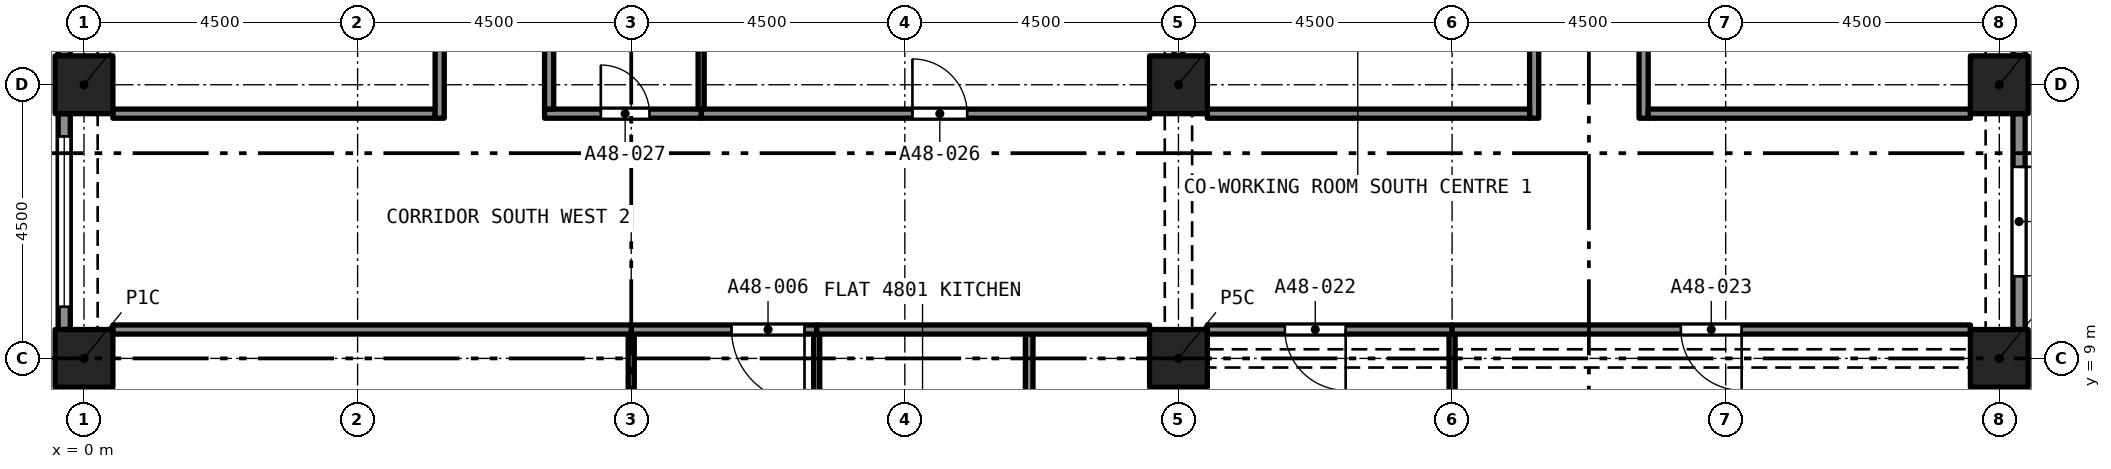
"""IFC4 building model, lengths in metres.
Left out: names, types, materials, properties, quantities, classifications, styles, units other than length and angle.
Written with IfcOpenShell. Run it as: python <this file> out.ifc"""

import sys

from ifc_helpers import new_model, si_unit, direction, frame, frame_2d, origin, origin_2d, place, context, subcontext, project, spatial, rectangle, extrude, element, fill, save


model = new_model("IFC4")
c1 = context("Model", 3, precision=1e-05, world=origin(), true_north=direction((0.0, 1.0)))
c2 = subcontext(c1, "Body", "Model", "MODEL_VIEW")
j1 = project(units=[si_unit("LENGTHUNIT", "METRE"), si_unit("PLANEANGLEUNIT", "RADIAN")], contexts=[c1])
p1 = place(None, origin())
s1 = spatial("IfcSite", under=j1, at=p1, CompositionType="ELEMENT")
p2 = place(p1, origin())
s2 = spatial("IfcBuilding", under=s1, at=p2, CompositionType="ELEMENT")
p3 = place(p2, frame((0.0, 0.0, 176.3)))
s3 = spatial("IfcBuildingStorey", under=s2, at=p3, CompositionType="ELEMENT", Elevation=176.3)
for number, where, z_axis, x_axis in (
    (1, (0.0, 9.0, 0.0), (0.0, 0.0, 1.0), (1.0, 0.0, 0.0)),
    (2, (18.0, 9.0, 0.0), (0.0, 0.0, 1.0), (1.0, 0.0, 0.0)),
    (3, (31.5, 9.0, 0.0), (0.0, 0.0, 1.0), (1.0, 0.0, 0.0)),
    (4, (0.0, 13.5, 0.0), (0.0, 0.0, 1.0), (1.0, 0.0, 0.0)),
    (5, (18.0, 13.5, 0.0), (0.0, 0.0, 1.0), (1.0, 0.0, 0.0)),
    (6, (31.5, 13.5, 0.0), (0.0, 0.0, 1.0), (1.0, 0.0, 0.0)),
):
    element("IfcColumn", number, at=place(p3, frame(where, z_axis=z_axis, x_axis=x_axis)), inside=s3, PredefinedType="COLUMN", context=c2, shape_type="SweptSolid", body=[
        extrude(rectangle(XDim=0.95, YDim=0.95, at=origin_2d()), origin(), (0.0, 0.0, 1.0), 3.2),
    ])
p4 = place(p3, frame((31.825, 8.525, 0.0), z_axis=(0.0, 0.0, 1.0), x_axis=(0.0, -1.0, 0.0)))
e7 = element("IfcWall", 7, at=p4, inside=s3, PredefinedType="SOLIDWALL", context=c2, shape_type="SweptSolid", body=[
    extrude(rectangle(XDim=3.55, YDim=0.2, at=frame_2d((1.775, 0.0))), origin(), (0.0, 0.0, 1.0), 3.2),
])
p5 = place(p4, frame((0.875, 0.0, 0.0)))
e8 = element("IfcOpeningElement", 8, at=p5, cuts=e7, PredefinedType="OPENING", context=c2, shape_type="SweptSolid", body=[
    extrude(rectangle(XDim=1.8, YDim=2.4, at=frame_2d((0.9, 1.2))), frame((0.0, 0.11, 0.0), z_axis=(0.0, -1.0, 0.0), x_axis=(1.0, 0.0, 0.0)), (0.0, 0.0, 1.0), 0.22),
])
p6 = place(p3, frame((31.825, 13.025, 0.0), z_axis=(0.0, 0.0, 1.0), x_axis=(0.0, -1.0, 0.0)))
e9 = element("IfcWall", 9, at=p6, inside=s3, PredefinedType="SOLIDWALL", context=c2, shape_type="SweptSolid", body=[
    extrude(rectangle(XDim=3.55, YDim=0.2, at=frame_2d((1.775, 0.0))), origin(), (0.0, 0.0, 1.0), 3.2),
])
p7 = place(p6, frame((0.875, 0.0, 0.0)))
e10 = element("IfcOpeningElement", 10, at=p7, cuts=e9, PredefinedType="OPENING", context=c2, shape_type="SweptSolid", body=[
    extrude(rectangle(XDim=1.8, YDim=2.4, at=frame_2d((0.9, 1.2))), frame((0.0, 0.11, 0.0), z_axis=(0.0, -1.0, 0.0), x_axis=(1.0, 0.0, 0.0)), (0.0, 0.0, 1.0), 0.22),
])
p8 = place(p3, frame((31.825, 17.525, 0.0), z_axis=(0.0, 0.0, 1.0), x_axis=(0.0, -1.0, 0.0)))
e11 = element("IfcWall", 11, at=p8, inside=s3, PredefinedType="SOLIDWALL", context=c2, shape_type="SweptSolid", body=[
    extrude(rectangle(XDim=3.55, YDim=0.2, at=frame_2d((1.775, 0.0))), origin(), (0.0, 0.0, 1.0), 3.2),
])
p9 = place(p8, frame((0.875, 0.0, 0.0)))
e12 = element("IfcOpeningElement", 12, at=p9, cuts=e11, PredefinedType="OPENING", context=c2, shape_type="SweptSolid", body=[
    extrude(rectangle(XDim=1.8, YDim=2.4, at=frame_2d((0.9, 1.2))), frame((0.0, 0.11, 0.0), z_axis=(0.0, -1.0, 0.0), x_axis=(1.0, 0.0, 0.0)), (0.0, 0.0, 1.0), 0.22),
])
p10 = place(p3, frame((-0.325, 13.975, 0.0), z_axis=(0.0, 0.0, 1.0), x_axis=(0.0, 1.0, 0.0)))
e13 = element("IfcWall", 13, at=p10, inside=s3, PredefinedType="SOLIDWALL", context=c2, shape_type="SweptSolid", body=[
    extrude(rectangle(XDim=3.55, YDim=0.2, at=frame_2d((1.775, 0.0))), origin(), (0.0, 0.0, 1.0), 3.2),
])
p11 = place(p10, frame((0.375, 0.0, 0.45)))
e14 = element("IfcOpeningElement", 14, at=p11, cuts=e13, PredefinedType="OPENING", context=c2, shape_type="SweptSolid", body=[
    extrude(rectangle(XDim=2.8, YDim=1.95, at=frame_2d((1.4, 0.975))), frame((0.0, 0.11, 0.0), z_axis=(0.0, -1.0, 0.0), x_axis=(1.0, 0.0, 0.0)), (0.0, 0.0, 1.0), 0.22),
])
p12 = place(p3, frame((-0.325, 9.475, 0.0), z_axis=(0.0, 0.0, 1.0), x_axis=(0.0, 1.0, 0.0)))
e15 = element("IfcWall", 15, at=p12, inside=s3, PredefinedType="SOLIDWALL", context=c2, shape_type="SweptSolid", body=[
    extrude(rectangle(XDim=3.55, YDim=0.2, at=frame_2d((1.775, 0.0))), origin(), (0.0, 0.0, 1.0), 3.2),
])
p13 = place(p12, frame((0.375, 0.0, 0.45)))
e16 = element("IfcOpeningElement", 16, at=p13, cuts=e15, PredefinedType="OPENING", context=c2, shape_type="SweptSolid", body=[
    extrude(rectangle(XDim=2.8, YDim=1.95, at=frame_2d((1.4, 0.975))), frame((0.0, 0.11, 0.0), z_axis=(0.0, -1.0, 0.0), x_axis=(1.0, 0.0, 0.0)), (0.0, 0.0, 1.0), 0.22),
])
p14 = place(p3, frame((-0.325, 4.975, 0.0), z_axis=(0.0, 0.0, 1.0), x_axis=(0.0, 1.0, 0.0)))
e17 = element("IfcWall", 17, at=p14, inside=s3, PredefinedType="SOLIDWALL", context=c2, shape_type="SweptSolid", body=[
    extrude(rectangle(XDim=3.55, YDim=0.2, at=frame_2d((1.775, 0.0))), origin(), (0.0, 0.0, 1.0), 3.2),
])
p15 = place(p14, frame((0.375, 0.0, 0.45)))
e18 = element("IfcOpeningElement", 18, at=p15, cuts=e17, PredefinedType="OPENING", context=c2, shape_type="SweptSolid", body=[
    extrude(rectangle(XDim=2.8, YDim=1.95, at=frame_2d((1.4, 0.975))), frame((0.0, 0.11, 0.0), z_axis=(0.0, -1.0, 0.0), x_axis=(1.0, 0.0, 0.0)), (0.0, 0.0, 1.0), 0.22),
])
p16 = place(p3, frame((15.545, 6.077, 0.0), z_axis=(0.0, 0.0, 1.0), x_axis=(0.0, 1.0, 0.0)))
e19 = element("IfcWall", 19, at=p16, inside=s3, PredefinedType="PARTITIONING", context=c2, shape_type="SweptSolid", body=[
    extrude(rectangle(XDim=3.323, YDim=0.125, at=frame_2d((1.661, 0.0))), origin(), (0.0, 0.0, 1.0), 2.9),
])
p17 = place(p3, frame((12.05, 6.065, 0.0), z_axis=(0.0, 0.0, 1.0), x_axis=(0.0, 1.0, 0.0)))
e20 = element("IfcWall", 20, at=p17, inside=s3, PredefinedType="PARTITIONING", context=c2, shape_type="SweptSolid", body=[
    extrude(rectangle(XDim=3.335, YDim=0.1, at=frame_2d((1.667, 0.0))), origin(), (0.0, 0.0, 1.0), 2.9),
])
p18 = place(p3, frame((9.0, 4.675, 0.0), z_axis=(0.0, 0.0, 1.0), x_axis=(0.0, 1.0, 0.0)))
e21 = element("IfcWall", 21, at=p18, inside=s3, PredefinedType="PARTITIONING", context=c2, shape_type="SweptSolid", body=[
    extrude(rectangle(XDim=4.725, YDim=0.1, at=frame_2d((2.362, 0.0))), origin(), (0.0, 0.0, 1.0), 2.9),
])
p19 = place(p18, frame((0.13, 0.0, 0.0)))
e22 = element("IfcOpeningElement", 22, at=p19, cuts=e21, PredefinedType="OPENING", context=c2, shape_type="SweptSolid", body=[
    extrude(rectangle(XDim=1.6, YDim=2.1, at=frame_2d((0.8, 1.05))), frame((0.0, 0.06, 0.0), z_axis=(0.0, -1.0, 0.0), x_axis=(1.0, 0.0, 0.0)), (0.0, 0.0, 1.0), 0.12),
])
p20 = place(p3, frame((18.0, 4.975, 0.0), z_axis=(0.0, 0.0, 1.0), x_axis=(0.0, 1.0, 0.0)))
e23 = element("IfcWall", 23, at=p20, inside=s3, PredefinedType="PARTITIONING", context=c2, shape_type="SweptSolid", body=[
    extrude(rectangle(XDim=3.55, YDim=0.25, at=frame_2d((1.775, 0.0))), origin(), (0.0, 0.0, 1.0), 2.38),
])
p21 = place(p3, frame((12.05, 9.475, 0.0), z_axis=(0.0, 0.0, 1.0), x_axis=(-1.0, 0.0, 0.0)))
e24 = element("IfcWall", 24, at=p21, inside=s3, PredefinedType="PARTITIONING", context=c2, shape_type="SweptSolid", body=[
    extrude(rectangle(XDim=3.05, YDim=0.15, at=frame_2d((1.525, 0.0))), origin(), (0.0, 0.0, 1.0), 2.9),
])
p22 = place(p21, frame((0.2, 0.0, 0.0)))
e25 = element("IfcOpeningElement", 25, at=p22, cuts=e24, PredefinedType="OPENING", context=c2, shape_type="SweptSolid", body=[
    extrude(rectangle(XDim=1.2, YDim=2.4, at=frame_2d((0.6, 1.2))), frame((0.0, 0.085, 0.0), z_axis=(0.0, -1.0, 0.0), x_axis=(1.0, 0.0, 0.0)), (0.0, 0.0, 1.0), 0.17),
])
p23 = place(p3, frame((12.05, 9.475, 0.0), z_axis=(0.0, 0.0, 1.0), x_axis=(1.0, 0.0, 0.0)))
e26 = element("IfcWall", 26, at=p23, inside=s3, PredefinedType="PARTITIONING", context=c2, shape_type="SweptSolid", body=[
    extrude(rectangle(XDim=5.475, YDim=0.15, at=frame_2d((2.737, 0.0))), origin(), (0.0, 0.0, 1.0), 2.9),
])
p24 = place(p3, frame((0.475, 9.475, 0.0), z_axis=(0.0, 0.0, 1.0), x_axis=(1.0, 0.0, 0.0)))
e27 = element("IfcWall", 27, at=p24, inside=s3, PredefinedType="PARTITIONING", context=c2, shape_type="SweptSolid", body=[
    extrude(rectangle(XDim=8.525, YDim=0.15, at=frame_2d((4.262, 0.0))), origin(), (0.0, 0.0, 1.0), 2.9),
])
p25 = place(p3, frame((22.5, 0.475, 0.0), z_axis=(0.0, 0.0, 1.0), x_axis=(0.0, 1.0, 0.0)))
e28 = element("IfcWall", 28, at=p25, inside=s3, PredefinedType="PARTITIONING", context=c2, shape_type="SweptSolid", body=[
    extrude(rectangle(XDim=8.925, YDim=0.1, at=frame_2d((4.462, 0.0))), origin(), (0.0, 0.0, 1.0), 2.75),
])
p26 = place(p3, frame((22.5, 9.475, 0.0), z_axis=(0.0, 0.0, 1.0), x_axis=(-1.0, 0.0, 0.0)))
e29 = element("IfcWall", 29, at=p26, inside=s3, PredefinedType="PARTITIONING", context=c2, shape_type="SweptSolid", body=[
    extrude(rectangle(XDim=4.025, YDim=0.15, at=frame_2d((2.012, 0.0))), origin(), (0.0, 0.0, 1.0), 2.75),
])
p27 = place(p26, frame((1.75, 0.0, 0.0)))
e30 = element("IfcOpeningElement", 30, at=p27, cuts=e29, PredefinedType="OPENING", context=c2, shape_type="SweptSolid", body=[
    extrude(rectangle(XDim=1.0, YDim=2.1, at=frame_2d((0.5, 1.05))), frame((0.0, 0.085, 0.0), z_axis=(0.0, -1.0, 0.0), x_axis=(1.0, 0.0, 0.0)), (0.0, 0.0, 1.0), 0.17),
])
p28 = place(p3, frame((31.025, 9.475, 0.0), z_axis=(0.0, 0.0, 1.0), x_axis=(-1.0, 0.0, 0.0)))
e31 = element("IfcWall", 31, at=p28, inside=s3, PredefinedType="PARTITIONING", context=c2, shape_type="SweptSolid", body=[
    extrude(rectangle(XDim=8.525, YDim=0.15, at=frame_2d((4.262, 0.0))), origin(), (0.0, 0.0, 1.0), 2.75),
])
p29 = place(p28, frame((3.762, 0.0, 0.0)))
e32 = element("IfcOpeningElement", 32, at=p29, cuts=e31, PredefinedType="OPENING", context=c2, shape_type="SweptSolid", body=[
    extrude(rectangle(XDim=1.0, YDim=2.1, at=frame_2d((0.5, 1.05))), frame((0.0, 0.085, 0.0), z_axis=(0.0, -1.0, 0.0), x_axis=(1.0, 0.0, 0.0)), (0.0, 0.0, 1.0), 0.17),
])
p30 = place(p3, frame((23.85, 12.95, 0.0), z_axis=(0.0, 0.0, 1.0), x_axis=(0.0, 1.0, 0.0)))
e33 = element("IfcWall", 33, at=p30, inside=s3, PredefinedType="PARTITIONING", context=c2, shape_type="SweptSolid", body=[
    extrude(rectangle(XDim=9.625, YDim=0.15, at=frame_2d((4.812, 0.0))), origin(), (0.0, 0.0, 1.0), 2.75),
])
p31 = place(p30, frame((4.312, 0.0, 0.0)))
e34 = element("IfcOpeningElement", 34, at=p31, cuts=e33, PredefinedType="OPENING", context=c2, shape_type="SweptSolid", body=[
    extrude(rectangle(XDim=1.0, YDim=2.1, at=frame_2d((0.5, 1.05))), frame((0.0, 0.085, 0.0), z_axis=(0.0, -1.0, 0.0), x_axis=(1.0, 0.0, 0.0)), (0.0, 0.0, 1.0), 0.17),
])
p32 = place(p3, frame((25.65, 22.575, 0.0), z_axis=(0.0, 0.0, 1.0), x_axis=(0.0, -1.0, 0.0)))
e35 = element("IfcWall", 35, at=p32, inside=s3, PredefinedType="PARTITIONING", context=c2, shape_type="SweptSolid", body=[
    extrude(rectangle(XDim=9.625, YDim=0.15, at=frame_2d((4.812, 0.0))), origin(), (0.0, 0.0, 1.0), 2.75),
])
p33 = place(p32, frame((4.312, 0.0, 0.0)))
e36 = element("IfcOpeningElement", 36, at=p33, cuts=e35, PredefinedType="OPENING", context=c2, shape_type="SweptSolid", body=[
    extrude(rectangle(XDim=1.0, YDim=2.1, at=frame_2d((0.5, 1.05))), frame((0.0, 0.085, 0.0), z_axis=(0.0, -1.0, 0.0), x_axis=(1.0, 0.0, 0.0)), (0.0, 0.0, 1.0), 0.17),
])
for number, where, z_axis, x_axis in (
    (37, (18.475, 13.025, 0.0), (0.0, 0.0, 1.0), (1.0, 0.0, 0.0)),
    (38, (25.725, 13.025, 0.0), (0.0, 0.0, 1.0), (1.0, 0.0, 0.0)),
):
    element("IfcWall", number, at=place(p3, frame(where, z_axis=z_axis, x_axis=x_axis)), inside=s3, PredefinedType="PARTITIONING", context=c2, shape_type="SweptSolid", body=[
        extrude(rectangle(XDim=5.3, YDim=0.15, at=frame_2d((2.65, 0.0))), origin(), (0.0, 0.0, 1.0), 2.75),
    ])
p34 = place(p3, frame((10.15, 13.025, 0.0), z_axis=(0.0, 0.0, 1.0), x_axis=(1.0, 0.0, 0.0)))
e39 = element("IfcWall", 39, at=p34, inside=s3, PredefinedType="PARTITIONING", context=c2, shape_type="SweptSolid", body=[
    extrude(rectangle(XDim=7.375, YDim=0.15, at=frame_2d((3.688, 0.0))), origin(), (0.0, 0.0, 1.0), 2.9),
])
p35 = place(p34, frame((3.475, 0.0, 0.0)))
e40 = element("IfcOpeningElement", 40, at=p35, cuts=e39, PredefinedType="OPENING", context=c2, shape_type="SweptSolid", body=[
    extrude(rectangle(XDim=0.9, YDim=2.1, at=frame_2d((0.45, 1.05))), frame((0.0, 0.085, 0.0), z_axis=(0.0, -1.0, 0.0), x_axis=(1.0, 0.0, 0.0)), (0.0, 0.0, 1.0), 0.17),
])
p36 = place(p3, frame((7.575, 13.025, 0.0), z_axis=(0.0, 0.0, 1.0), x_axis=(1.0, 0.0, 0.0)))
e41 = element("IfcWall", 41, at=p36, inside=s3, PredefinedType="PARTITIONING", context=c2, shape_type="SweptSolid", body=[
    extrude(rectangle(XDim=2.575, YDim=0.15, at=frame_2d((1.288, 0.0))), origin(), (0.0, 0.0, 1.0), 2.9),
])
p37 = place(p36, frame((0.925, 0.0, 0.0)))
e42 = element("IfcOpeningElement", 42, at=p37, cuts=e41, PredefinedType="OPENING", context=c2, shape_type="SweptSolid", body=[
    extrude(rectangle(XDim=0.8, YDim=2.1, at=frame_2d((0.4, 1.05))), frame((0.0, 0.085, 0.0), z_axis=(0.0, -1.0, 0.0), x_axis=(1.0, 0.0, 0.0)), (0.0, 0.0, 1.0), 0.17),
])
p38 = place(p3, frame((0.475, 13.025, 0.0), z_axis=(0.0, 0.0, 1.0), x_axis=(1.0, 0.0, 0.0)))
e43 = element("IfcWall", 43, at=p38, inside=s3, PredefinedType="PARTITIONING", context=c2, shape_type="SweptSolid", body=[
    extrude(rectangle(XDim=5.3, YDim=0.15, at=frame_2d((2.65, 0.0))), origin(), (0.0, 0.0, 1.0), 2.9),
])
p39 = place(p3, frame((18.0, 13.975, 0.0), z_axis=(0.0, 0.0, 1.0), x_axis=(0.0, 1.0, 0.0)))
e44 = element("IfcWall", 44, at=p39, inside=s3, PredefinedType="PARTITIONING", context=c2, shape_type="SweptSolid", body=[
    extrude(rectangle(XDim=1.65, YDim=0.15, at=frame_2d((0.825, 0.0))), origin(), (0.0, 0.0, 1.0), 2.38),
])
p40 = place(p3, frame((7.65, 13.1, 0.0), z_axis=(0.0, 0.0, 1.0), x_axis=(0.0, 1.0, 0.0)))
e45 = element("IfcWall", 45, at=p40, inside=s3, PredefinedType="PARTITIONING", context=c2, shape_type="SweptSolid", body=[
    extrude(rectangle(XDim=2.525, YDim=0.15, at=frame_2d((1.262, 0.0))), origin(), (0.0, 0.0, 1.0), 2.9),
])
p41 = place(p3, frame((5.85, 12.95, 0.0), z_axis=(0.0, 0.0, 1.0), x_axis=(0.0, 1.0, 0.0)))
e46 = element("IfcWall", 46, at=p41, inside=s3, PredefinedType="PARTITIONING", context=c2, shape_type="SweptSolid", body=[
    extrude(rectangle(XDim=9.55, YDim=0.15, at=frame_2d((4.775, 0.0))), origin(), (0.0, 0.0, 1.0), 2.9),
])
p42 = place(p41, frame((4.312, 0.0, 0.0)))
e47 = element("IfcOpeningElement", 47, at=p42, cuts=e46, PredefinedType="OPENING", context=c2, shape_type="SweptSolid", body=[
    extrude(rectangle(XDim=1.0, YDim=2.1, at=frame_2d((0.5, 1.05))), frame((0.0, 0.085, 0.0), z_axis=(0.0, -1.0, 0.0), x_axis=(1.0, 0.0, 0.0)), (0.0, 0.0, 1.0), 0.17),
])
p43 = place(p3, frame((10.15, 13.1, 0.0), z_axis=(0.0, 0.0, 1.0), x_axis=(0.0, 1.0, 0.0)))
e48 = element("IfcWall", 48, at=p43, inside=s3, PredefinedType="PARTITIONING", context=c2, shape_type="SweptSolid", body=[
    extrude(rectangle(XDim=2.45, YDim=0.1, at=frame_2d((1.225, 0.0))), origin(), (0.0, 0.0, 1.0), 2.9),
])
p44 = place(p13, origin())
e49 = element("IfcWindow", 49, at=p44, inside=s3, PartitioningType="SINGLE_PANEL", PredefinedType="WINDOW", context=c2, shape_type="SweptSolid", body=[
    extrude(rectangle(XDim=2.8, YDim=1.95, at=frame_2d((1.4, 0.975))), frame((0.0, 0.03, 0.0), z_axis=(0.0, -1.0, 0.0), x_axis=(1.0, 0.0, 0.0)), (0.0, 0.0, 1.0), 0.06),
])
fill(e16, e49)
p45 = place(p7, origin())
e50 = element("IfcDoor", 50, at=p45, inside=s3, OperationType="DOUBLE_DOOR_SINGLE_SWING", PredefinedType="DOOR", context=c2, shape_type="SweptSolid", body=[
    extrude(rectangle(XDim=1.8, YDim=2.4, at=frame_2d((0.9, 1.2))), frame((0.0, 0.025, 0.0), z_axis=(0.0, -1.0, 0.0), x_axis=(1.0, 0.0, 0.0)), (0.0, 0.0, 1.0), 0.05),
])
fill(e10, e50)
p46 = place(p22, origin())
e51 = element("IfcDoor", 51, at=p46, inside=s3, OperationType="SINGLE_SWING_LEFT", PredefinedType="DOOR", context=c2, shape_type="SweptSolid", body=[
    extrude(rectangle(XDim=1.2, YDim=2.4, at=frame_2d((0.6, 1.2))), frame((0.0, 0.025, 0.0), z_axis=(0.0, -1.0, 0.0), x_axis=(1.0, 0.0, 0.0)), (0.0, 0.0, 1.0), 0.05),
])
fill(e25, e51)
p47 = place(p27, origin())
e52 = element("IfcDoor", 52, at=p47, inside=s3, OperationType="SINGLE_SWING_RIGHT", PredefinedType="DOOR", context=c2, shape_type="SweptSolid", body=[
    extrude(rectangle(XDim=1.0, YDim=2.1, at=frame_2d((0.5, 1.05))), frame((0.0, 0.025, 0.0), z_axis=(0.0, -1.0, 0.0), x_axis=(1.0, 0.0, 0.0)), (0.0, 0.0, 1.0), 0.05),
])
fill(e30, e52)
p48 = place(p29, origin())
e53 = element("IfcDoor", 53, at=p48, inside=s3, OperationType="SINGLE_SWING_RIGHT", PredefinedType="DOOR", context=c2, shape_type="SweptSolid", body=[
    extrude(rectangle(XDim=1.0, YDim=2.1, at=frame_2d((0.5, 1.05))), frame((0.0, 0.025, 0.0), z_axis=(0.0, -1.0, 0.0), x_axis=(1.0, 0.0, 0.0)), (0.0, 0.0, 1.0), 0.05),
])
fill(e32, e53)
p49 = place(p35, origin())
e54 = element("IfcDoor", 54, at=p49, inside=s3, OperationType="SINGLE_SWING_RIGHT", PredefinedType="DOOR", context=c2, shape_type="SweptSolid", body=[
    extrude(rectangle(XDim=0.9, YDim=2.1, at=frame_2d((0.45, 1.05))), frame((0.0, 0.025, 0.0), z_axis=(0.0, -1.0, 0.0), x_axis=(1.0, 0.0, 0.0)), (0.0, 0.0, 1.0), 0.05),
])
fill(e40, e54)
p50 = place(p37, origin())
e55 = element("IfcDoor", 55, at=p50, inside=s3, OperationType="SINGLE_SWING_RIGHT", PredefinedType="DOOR", context=c2, shape_type="SweptSolid", body=[
    extrude(rectangle(XDim=0.8, YDim=2.1, at=frame_2d((0.4, 1.05))), frame((0.0, 0.025, 0.0), z_axis=(0.0, -1.0, 0.0), x_axis=(1.0, 0.0, 0.0)), (0.0, 0.0, 1.0), 0.05),
])
fill(e42, e55)
save(model, sys.argv[1])
